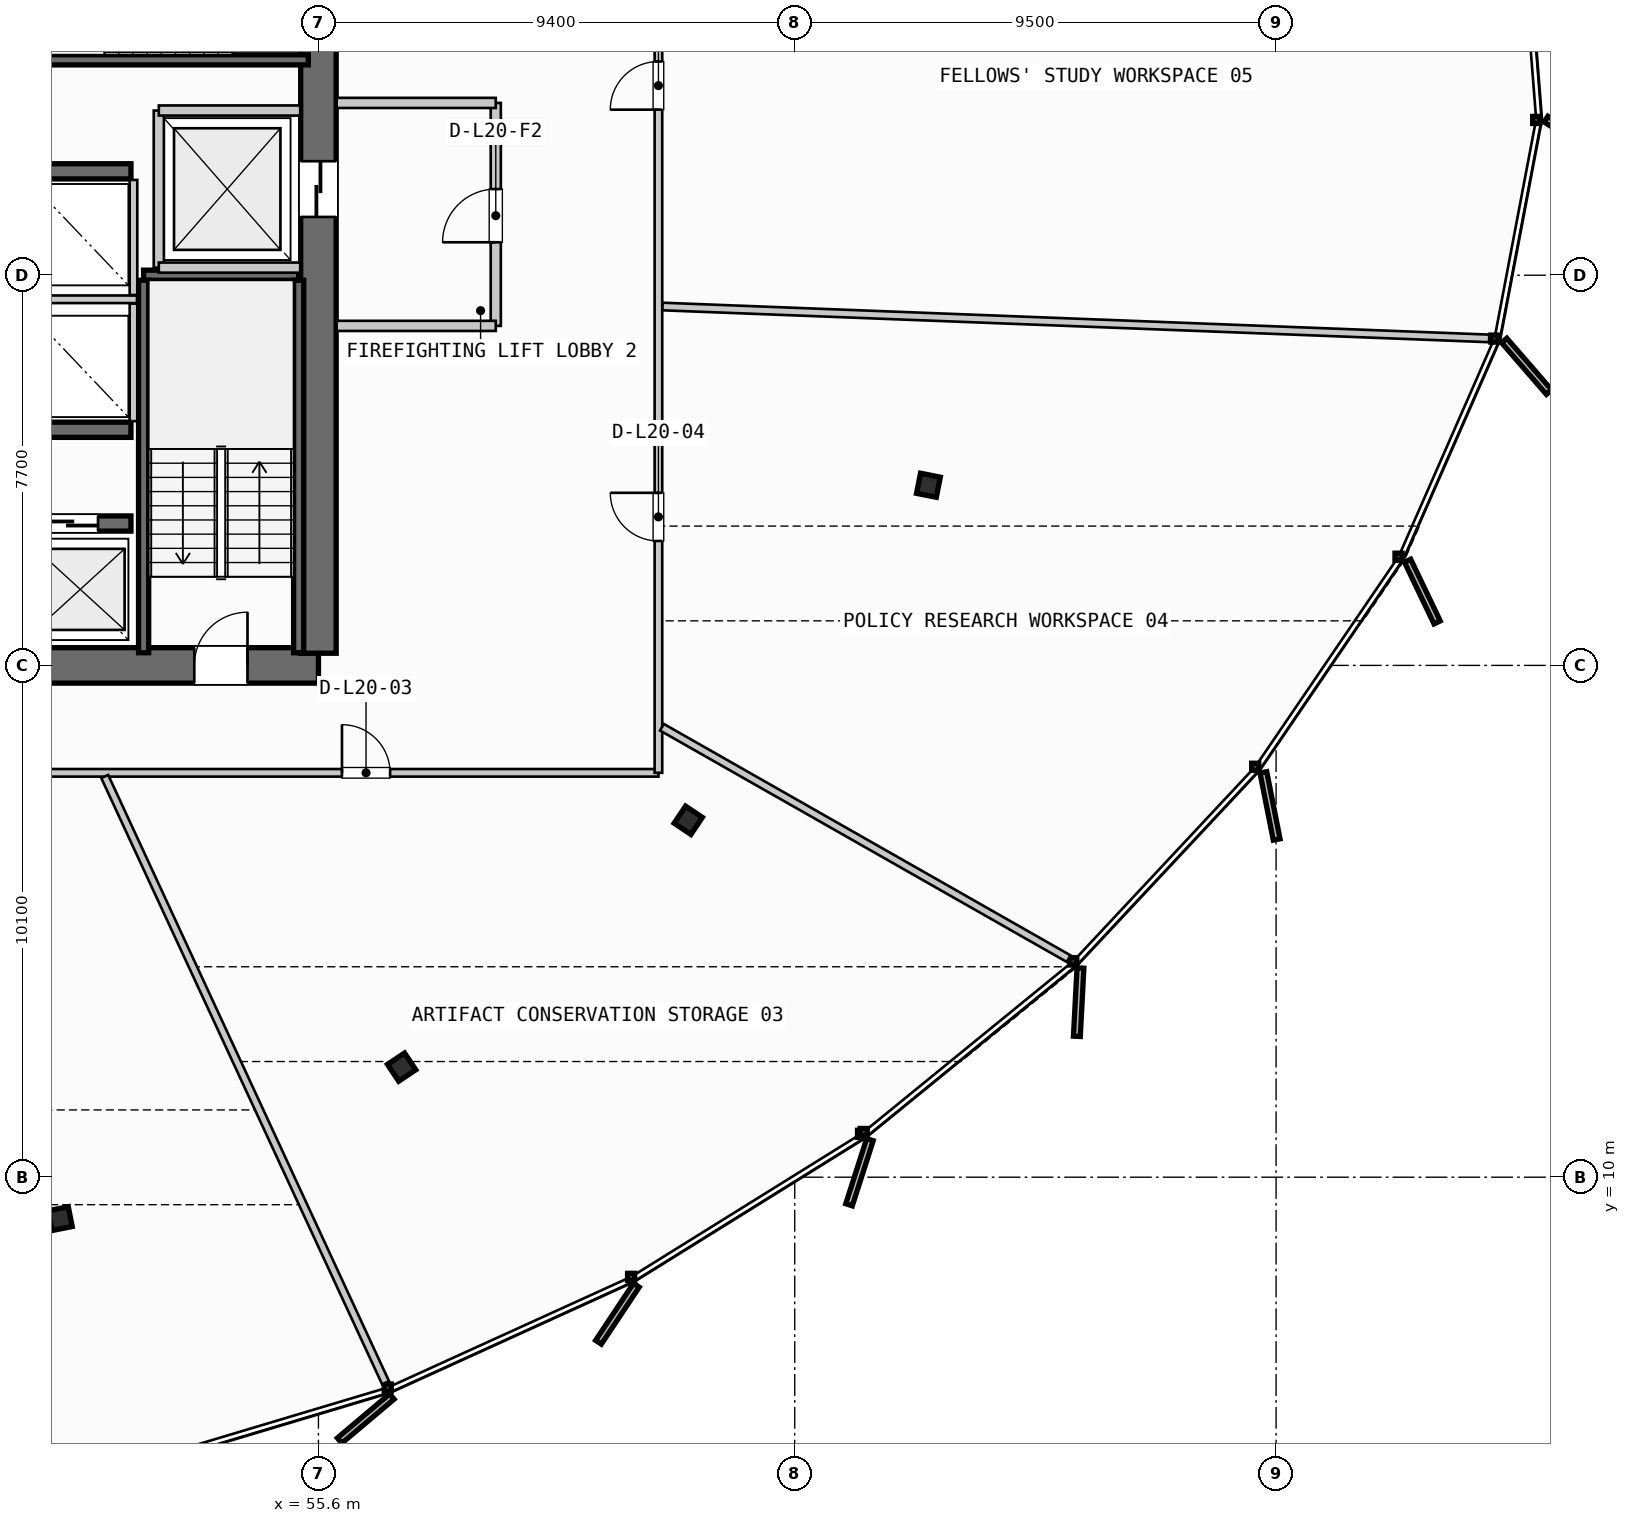
"""IFC4 building model, lengths in metres.
Left out: names, types, materials, properties, quantities, classifications, styles, units other than length and angle.
Written with IfcOpenShell. Run it as: python <this file> out.ifc"""

import sys

from ifc_helpers import new_model, si_unit, direction, frame, frame_2d, origin, origin_2d, place, context, subcontext, project, spatial, rectangle, i_section, extrude, source, transform, mapped, element, fill, save


model = new_model("IFC4")
c1 = context("Model", 3, precision=1e-05, world=origin(), true_north=direction((0.0, 1.0)))
c2 = subcontext(c1, "Body", "Model", "MODEL_VIEW")
j1 = project(units=[si_unit("LENGTHUNIT", "METRE"), si_unit("PLANEANGLEUNIT", "RADIAN")], contexts=[c1])
p1 = place(None, origin())
s1 = spatial("IfcSite", under=j1, at=p1, CompositionType="ELEMENT")
p2 = place(p1, origin())
s2 = spatial("IfcBuilding", under=s1, at=p2, CompositionType="ELEMENT")
p3 = place(p2, frame((0.0, 0.0, 85.6)))
s3 = spatial("IfcBuildingStorey", under=s2, at=p3, CompositionType="ELEMENT", Elevation=85.6)
p4 = place(p3, frame((38.0, 20.1, 0.0), z_axis=(0.0, 0.0, 1.0), x_axis=(1.0, 0.0, 0.0)))
e1 = element("IfcWall", 1, at=p4, inside=s3, PredefinedType="SHEAR", context=c2, shape_type="SweptSolid", body=[
    extrude(rectangle(XDim=17.6, YDim=0.7, at=frame_2d((8.8, 0.0))), origin(), (0.0, 0.0, 1.0), 3.35),
])
p5 = place(p4, frame((1.4, 0.0, 0.0)))
e2 = element("IfcOpeningElement", 2, at=p5, cuts=e1, PredefinedType="OPENING", context=c2, shape_type="SweptSolid", body=[
    extrude(rectangle(XDim=1.05, YDim=2.15, at=frame_2d((0.525, 1.075))), frame((0.0, 0.36, 0.0), z_axis=(0.0, -1.0, 0.0), x_axis=(1.0, 0.0, 0.0)), (0.0, 0.0, 1.0), 0.72),
])
p6 = place(p4, frame((15.15, 0.0, 0.0)))
e3 = element("IfcOpeningElement", 3, at=p6, cuts=e1, PredefinedType="OPENING", context=c2, shape_type="SweptSolid", body=[
    extrude(rectangle(XDim=1.05, YDim=2.15, at=frame_2d((0.525, 1.075))), frame((0.0, 0.36, 0.0), z_axis=(0.0, -1.0, 0.0), x_axis=(1.0, 0.0, 0.0)), (0.0, 0.0, 1.0), 0.72),
])
p7 = place(p3, frame((55.6, 20.34, 0.0), z_axis=(0.0, 0.0, 1.0), x_axis=(0.0, 1.0, 0.0)))
e4 = element("IfcWall", 4, at=p7, inside=s3, PredefinedType="SHEAR", context=c2, shape_type="SweptSolid", body=[
    extrude(rectangle(XDim=14.92, YDim=0.7, at=frame_2d((7.46, 0.0))), origin(), (0.0, 0.0, 1.0), 3.35),
])
p8 = place(p7, frame((12.71, 0.0, 0.0)))
e5 = element("IfcOpeningElement", 5, at=p8, cuts=e4, PredefinedType="OPENING", context=c2, shape_type="SweptSolid", body=[
    extrude(rectangle(XDim=1.05, YDim=2.15, at=frame_2d((0.525, 1.075))), frame((0.0, 0.36, 0.0), z_axis=(0.0, -1.0, 0.0), x_axis=(1.0, 0.0, 0.0)), (0.0, 0.0, 1.0), 0.72),
])
p9 = place(p7, frame((8.61, 0.0, 0.0)))
e6 = element("IfcOpeningElement", 6, at=p9, cuts=e4, PredefinedType="OPENING", context=c2, shape_type="SweptSolid", body=[
    extrude(rectangle(XDim=1.1, YDim=2.2, at=frame_2d((0.55, 1.1))), frame((0.0, 0.36, 0.0), z_axis=(0.0, -1.0, 0.0), x_axis=(1.0, 0.0, 0.0)), (0.0, 0.0, 1.0), 0.72),
])
p10 = place(p3, frame((47.65, 22.9, 0.0), z_axis=(0.0, 0.0, 1.0), x_axis=(1.0, 0.0, 0.0)))
e7 = element("IfcWall", 7, at=p10, inside=s3, PredefinedType="SHEAR", context=c2, shape_type="SweptSolid", body=[
    extrude(rectangle(XDim=4.25, YDim=0.3, at=frame_2d((2.125, 0.0))), origin(), (0.0, 0.0, 1.0), 3.35),
])
p11 = place(p10, frame((0.45, 0.0, 0.0)))
e8 = element("IfcOpeningElement", 8, at=p11, cuts=e7, PredefinedType="OPENING", context=c2, shape_type="SweptSolid", body=[
    extrude(rectangle(XDim=1.1, YDim=2.2, at=frame_2d((0.55, 1.1))), frame((0.0, 0.16, 0.0), z_axis=(0.0, -1.0, 0.0), x_axis=(1.0, 0.0, 0.0)), (0.0, 0.0, 1.0), 0.32),
])
p12 = place(p10, frame((2.5, 0.0, 0.0)))
e9 = element("IfcOpeningElement", 9, at=p12, cuts=e7, PredefinedType="OPENING", context=c2, shape_type="SweptSolid", body=[
    extrude(rectangle(XDim=1.1, YDim=2.2, at=frame_2d((0.55, 1.1))), frame((0.0, 0.16, 0.0), z_axis=(0.0, -1.0, 0.0), x_axis=(1.0, 0.0, 0.0)), (0.0, 0.0, 1.0), 0.32),
])
for number, where, z_axis, x_axis in (
    (10, (47.65, 24.75, 0.0), (0.0, 0.0, 1.0), (1.0, 0.0, 0.0)),
    (11, (47.65, 29.85, 0.0), (0.0, 0.0, 1.0), (1.0, 0.0, 0.0)),
):
    element("IfcWall", number, at=place(p3, frame(where, z_axis=z_axis, x_axis=x_axis)), inside=s3, PredefinedType="SHEAR", context=c2, shape_type="SweptSolid", body=[
        extrude(rectangle(XDim=4.25, YDim=0.3, at=frame_2d((2.125, 0.0))), origin(), (0.0, 0.0, 1.0), 3.35),
    ])
m1 = source(origin(), c2, "Body", "SweptSolid", [
    extrude(i_section(OverallWidth=0.405, OverallDepth=0.398, WebThickness=0.035, FlangeThickness=0.056, FilletRadius=0.015, at=origin_2d()), origin(), (0.0, 0.0, 1.0), 3.35),
])
for number, where, z_axis, x_axis in (
    (12, (50.503, 9.182, 0.0), (0.0, 0.0, 1.0), (0.195, -0.981, 0.0)),
    (13, (57.242, 12.172, 0.0), (0.0, 0.0, 1.0), (0.556, -0.831, 0.0)),
    (14, (62.899, 17.043, 0.0), (0.0, 0.0, 1.0), (0.831, -0.556, 0.0)),
    (15, (67.639, 23.655, 0.0), (0.0, 0.0, 1.0), (0.981, -0.195, 0.0)),
):
    element("IfcColumn", number, at=place(p3, frame(where, z_axis=z_axis, x_axis=x_axis)), inside=s3, PredefinedType="COLUMN", context=c2, shape_type="MappedRepresentation", body=[
        mapped(m1, transform((0.0, 0.0, 0.0), scale=1.0)),
    ])
p13 = place(p3, frame((52.15, 27.8, 0.0), z_axis=(0.0, 0.0, 1.0), x_axis=(1.0, 0.0, 0.0)))
e16 = element("IfcWall", 16, at=p13, inside=s3, PredefinedType="SHEAR", context=c2, shape_type="SweptSolid", body=[
    extrude(rectangle(XDim=3.06, YDim=0.2, at=frame_2d((1.53, 0.0))), origin(), (0.0, 0.0, 1.0), 3.35),
])
for number, where, z_axis, x_axis in (
    (17, (55.21, 27.7, 0.0), (0.0, 0.0, 1.0), (0.0, -1.0, 0.0)),
    (18, (52.15, 20.35, 0.0), (0.0, 0.0, 1.0), (0.0, 1.0, 0.0)),
    (19, (55.4, 32.05, 0.0), (0.0, 0.0, 1.0), (-1.0, 0.0, 0.0)),
):
    element("IfcWall", number, at=place(p3, frame(where, z_axis=z_axis, x_axis=x_axis)), inside=s3, PredefinedType="SHEAR", context=c2, shape_type="SweptSolid", body=[
        extrude(rectangle(XDim=7.35, YDim=0.2, at=frame_2d((3.675, 0.0))), origin(), (0.0, 0.0, 1.0), 3.35),
    ])
p14 = place(p3, frame((52.45, 27.95, 0.0), z_axis=(0.0, 0.0, 1.0), x_axis=(0.0, 1.0, 0.0)))
e20 = element("IfcWall", 20, at=p14, inside=s3, PredefinedType="PARTITIONING", context=c2, shape_type="SweptSolid", body=[
    extrude(rectangle(XDim=3.1, YDim=0.2, at=frame_2d((1.55, 0.0))), origin(), (0.0, 0.0, 1.0), 2.28),
])
for number, where, z_axis, x_axis in (
    (21, (52.45, 27.95, 0.0), (0.0, 0.0, 1.0), (1.0, 0.0, 0.0)),
    (22, (52.45, 31.05, 0.0), (0.0, 0.0, 1.0), (1.0, 0.0, 0.0)),
):
    element("IfcWall", number, at=place(p3, frame(where, z_axis=z_axis, x_axis=x_axis)), inside=s3, PredefinedType="PARTITIONING", context=c2, shape_type="SweptSolid", body=[
        extrude(rectangle(XDim=2.79, YDim=0.2, at=frame_2d((1.395, 0.0))), origin(), (0.0, 0.0, 1.0), 2.28),
    ])
p15 = place(p3, frame((59.1, 26.8, 0.0), z_axis=(0.0, 0.0, 1.0), x_axis=(0.0, 1.0, 0.0)))
e23 = element("IfcWall", 23, at=p15, inside=s3, PredefinedType="PARTITIONING", context=c2, shape_type="SweptSolid", body=[
    extrude(rectangle(XDim=4.4, YDim=0.2, at=frame_2d((2.2, 0.0))), origin(), (0.0, 0.0, 1.0), 2.28),
])
p16 = place(p15, frame((1.65, 0.0, 0.0)))
e24 = element("IfcOpeningElement", 24, at=p16, cuts=e23, PredefinedType="OPENING", context=c2, shape_type="SweptSolid", body=[
    extrude(rectangle(XDim=1.05, YDim=2.15, at=frame_2d((0.525, 1.075))), frame((0.0, 0.11, 0.0), z_axis=(0.0, -1.0, 0.0), x_axis=(1.0, 0.0, 0.0)), (0.0, 0.0, 1.0), 0.22),
])
for number, where, z_axis, x_axis in (
    (25, (55.96, 26.8, 0.0), (0.0, 0.0, 1.0), (1.0, 0.0, 0.0)),
    (26, (55.96, 31.2, 0.0), (0.0, 0.0, 1.0), (1.0, 0.0, 0.0)),
):
    element("IfcWall", number, at=place(p3, frame(where, z_axis=z_axis, x_axis=x_axis)), inside=s3, PredefinedType="PARTITIONING", context=c2, shape_type="SweptSolid", body=[
        extrude(rectangle(XDim=3.14, YDim=0.2, at=frame_2d((1.57, 0.0))), origin(), (0.0, 0.0, 1.0), 2.28),
    ])
p17 = place(p3, frame((47.7, 27.325, 0.0), z_axis=(0.0, 0.0, 1.0), x_axis=(1.0, 0.0, 0.0)))
e27 = element("IfcWall", 27, at=p17, inside=s3, PredefinedType="PARTITIONING", context=c2, shape_type="SweptSolid", body=[
    extrude(rectangle(XDim=4.32, YDim=0.15, at=frame_2d((2.16, 0.0))), origin(), (0.0, 0.0, 1.0), 2.28),
])
p18 = place(p3, frame((51.95, 24.92, 0.0), z_axis=(0.0, 0.0, 1.0), x_axis=(0.0, 1.0, 0.0)))
e28 = element("IfcWall", 28, at=p18, inside=s3, PredefinedType="PARTITIONING", context=c2, shape_type="SweptSolid", body=[
    extrude(rectangle(XDim=2.32, YDim=0.15, at=frame_2d((1.16, 0.0))), origin(), (0.0, 0.0, 1.0), 2.28),
])
p19 = place(p3, frame((51.95, 27.41, 0.0), z_axis=(0.0, 0.0, 1.0), x_axis=(0.0, 1.0, 0.0)))
e29 = element("IfcWall", 29, at=p19, inside=s3, PredefinedType="PARTITIONING", context=c2, shape_type="SweptSolid", body=[
    extrude(rectangle(XDim=2.27, YDim=0.15, at=frame_2d((1.135, 0.0))), origin(), (0.0, 0.0, 1.0), 2.28),
])
p20 = place(p3, frame((30.77, 17.98, 0.0), z_axis=(0.0, 0.0, 1.0), x_axis=(1.0, 0.0, 0.0)))
e30 = element("IfcWall", 30, at=p20, inside=s3, PredefinedType="PARTITIONING", context=c2, shape_type="SweptSolid", body=[
    extrude(rectangle(XDim=31.54, YDim=0.15, at=frame_2d((15.77, 0.0))), origin(), (0.0, 0.0, 1.0), 2.28),
])
p21 = place(p20, frame((3.271, 0.0, 0.0)))
e31 = element("IfcOpeningElement", 31, at=p21, cuts=e30, PredefinedType="OPENING", context=c2, shape_type="SweptSolid", body=[
    extrude(rectangle(XDim=0.95, YDim=2.15, at=frame_2d((0.475, 1.075))), frame((0.0, 0.085, 0.0), z_axis=(0.0, -1.0, 0.0), x_axis=(1.0, 0.0, 0.0)), (0.0, 0.0, 1.0), 0.17),
])
p22 = place(p20, frame((13.234, 0.0, 0.0)))
e32 = element("IfcOpeningElement", 32, at=p22, cuts=e30, PredefinedType="OPENING", context=c2, shape_type="SweptSolid", body=[
    extrude(rectangle(XDim=0.95, YDim=2.15, at=frame_2d((0.475, 1.075))), frame((0.0, 0.085, 0.0), z_axis=(0.0, -1.0, 0.0), x_axis=(1.0, 0.0, 0.0)), (0.0, 0.0, 1.0), 0.17),
])
p23 = place(p20, frame((25.295, 0.0, 0.0)))
e33 = element("IfcOpeningElement", 33, at=p23, cuts=e30, PredefinedType="OPENING", context=c2, shape_type="SweptSolid", body=[
    extrude(rectangle(XDim=0.95, YDim=2.15, at=frame_2d((0.475, 1.075))), frame((0.0, 0.085, 0.0), z_axis=(0.0, -1.0, 0.0), x_axis=(1.0, 0.0, 0.0)), (0.0, 0.0, 1.0), 0.17),
])
p24 = place(p3, frame((62.31, 17.98, 0.0), z_axis=(0.0, 0.0, 1.0), x_axis=(0.0, 1.0, 0.0)))
e34 = element("IfcWall", 34, at=p24, inside=s3, PredefinedType="PARTITIONING", context=c2, shape_type="SweptSolid", body=[
    extrude(rectangle(XDim=20.06, YDim=0.15, at=frame_2d((10.03, 0.0))), origin(), (0.0, 0.0, 1.0), 2.28),
])
p25 = place(p24, frame((4.576, 0.0, 0.0)))
e35 = element("IfcOpeningElement", 35, at=p25, cuts=e34, PredefinedType="OPENING", context=c2, shape_type="SweptSolid", body=[
    extrude(rectangle(XDim=0.95, YDim=2.15, at=frame_2d((0.475, 1.075))), frame((0.0, 0.085, 0.0), z_axis=(0.0, -1.0, 0.0), x_axis=(1.0, 0.0, 0.0)), (0.0, 0.0, 1.0), 0.17),
])
p26 = place(p24, frame((13.087, 0.0, 0.0)))
e36 = element("IfcOpeningElement", 36, at=p26, cuts=e34, PredefinedType="OPENING", context=c2, shape_type="SweptSolid", body=[
    extrude(rectangle(XDim=0.95, YDim=2.15, at=frame_2d((0.475, 1.075))), frame((0.0, 0.085, 0.0), z_axis=(0.0, -1.0, 0.0), x_axis=(1.0, 0.0, 0.0)), (0.0, 0.0, 1.0), 0.17),
])
p27 = place(p3, frame((51.383, 17.907, 0.0), z_axis=(0.0, 0.0, 1.0), x_axis=(0.420357651393, -0.907358498564, 0.0)))
e37 = element("IfcWall", 37, at=p27, inside=s3, PredefinedType="PARTITIONING", context=c2, shape_type="SweptSolid", body=[
    extrude(rectangle(XDim=13.185, YDim=0.15, at=frame_2d((6.592, 0.0))), origin(), (0.0, 0.0, 1.0), 2.28),
])
p28 = place(p3, frame((62.379, 18.879, 0.0), z_axis=(0.0, 0.0, 1.0), x_axis=(0.86919988311, -0.494460881366, 0.0)))
e38 = element("IfcWall", 38, at=p28, inside=s3, PredefinedType="PARTITIONING", context=c2, shape_type="SweptSolid", body=[
    extrude(rectangle(XDim=9.234, YDim=0.15, at=frame_2d((4.617, 0.0))), origin(), (0.0, 0.0, 1.0), 2.28),
])
p29 = place(p3, frame((62.39, 27.183, 0.0), z_axis=(0.0, 0.0, 1.0), x_axis=(0.999256152386, -0.038563479088, 0.0)))
e39 = element("IfcWall", 39, at=p29, inside=s3, PredefinedType="PARTITIONING", context=c2, shape_type="SweptSolid", body=[
    extrude(rectangle(XDim=16.327, YDim=0.15, at=frame_2d((8.164, 0.0))), origin(), (0.0, 0.0, 1.0), 2.28),
])
m2 = source(origin(), c2, "Body", "SweptSolid", [
    extrude(rectangle(XDim=1.05, YDim=2.15, at=frame_2d((0.525, 1.075))), frame((0.0, 0.025, 0.0), z_axis=(0.0, -1.0, 0.0), x_axis=(1.0, 0.0, 0.0)), (0.0, 0.0, 1.0), 0.05),
])
p30 = place(p6, origin())
e40 = element("IfcDoor", 40, at=p30, inside=s3, OperationType="SINGLE_SWING_RIGHT", PredefinedType="DOOR", context=c2, shape_type="MappedRepresentation", body=[
    mapped(m2, transform((0.0, 0.0, 0.0), scale=1.0)),
])
fill(e3, e40)
m3 = source(origin(), c2, "Body", "SweptSolid", [
    extrude(rectangle(XDim=1.1, YDim=2.2, at=frame_2d((0.55, 1.1))), frame((0.0, 0.025, 0.0), z_axis=(0.0, -1.0, 0.0), x_axis=(1.0, 0.0, 0.0)), (0.0, 0.0, 1.0), 0.05),
])
p31 = place(p9, origin())
e41 = element("IfcDoor", 41, at=p31, inside=s3, OperationType="SLIDING_TO_RIGHT", PredefinedType="DOOR", context=c2, shape_type="MappedRepresentation", body=[
    mapped(m3, transform((0.0, 0.0, 0.0), scale=1.0)),
])
fill(e6, e41)
p32 = place(p12, origin())
e42 = element("IfcDoor", 42, at=p32, inside=s3, OperationType="SLIDING_TO_LEFT", PredefinedType="DOOR", context=c2, shape_type="MappedRepresentation", body=[
    mapped(m3, transform((0.0, 0.0, 0.0), scale=1.0)),
])
fill(e9, e42)
p33 = place(p16, origin())
e43 = element("IfcDoor", 43, at=p33, inside=s3, OperationType="SINGLE_SWING_LEFT", PredefinedType="DOOR", context=c2, shape_type="MappedRepresentation", body=[
    mapped(m2, transform((0.0, 0.0, 0.0), scale=1.0)),
])
fill(e24, e43)
m4 = source(origin(), c2, "Body", "SweptSolid", [
    extrude(rectangle(XDim=0.95, YDim=2.15, at=frame_2d((0.475, 1.075))), frame((0.0, 0.025, 0.0), z_axis=(0.0, -1.0, 0.0), x_axis=(1.0, 0.0, 0.0)), (0.0, 0.0, 1.0), 0.05),
])
p34 = place(p23, origin())
e44 = element("IfcDoor", 44, at=p34, inside=s3, OperationType="SINGLE_SWING_LEFT", PredefinedType="DOOR", context=c2, shape_type="MappedRepresentation", body=[
    mapped(m4, transform((0.0, 0.0, 0.0), scale=1.0)),
])
fill(e33, e44)
p35 = place(p25, origin())
e45 = element("IfcDoor", 45, at=p35, inside=s3, OperationType="SINGLE_SWING_RIGHT", PredefinedType="DOOR", context=c2, shape_type="MappedRepresentation", body=[
    mapped(m4, transform((0.0, 0.0, 0.0), scale=1.0)),
])
fill(e35, e45)
p36 = place(p26, origin())
e46 = element("IfcDoor", 46, at=p36, inside=s3, OperationType="SINGLE_SWING_LEFT", PredefinedType="DOOR", context=c2, shape_type="MappedRepresentation", body=[
    mapped(m4, transform((0.0, 0.0, 0.0), scale=1.0)),
])
fill(e36, e46)
save(model, sys.argv[1])
